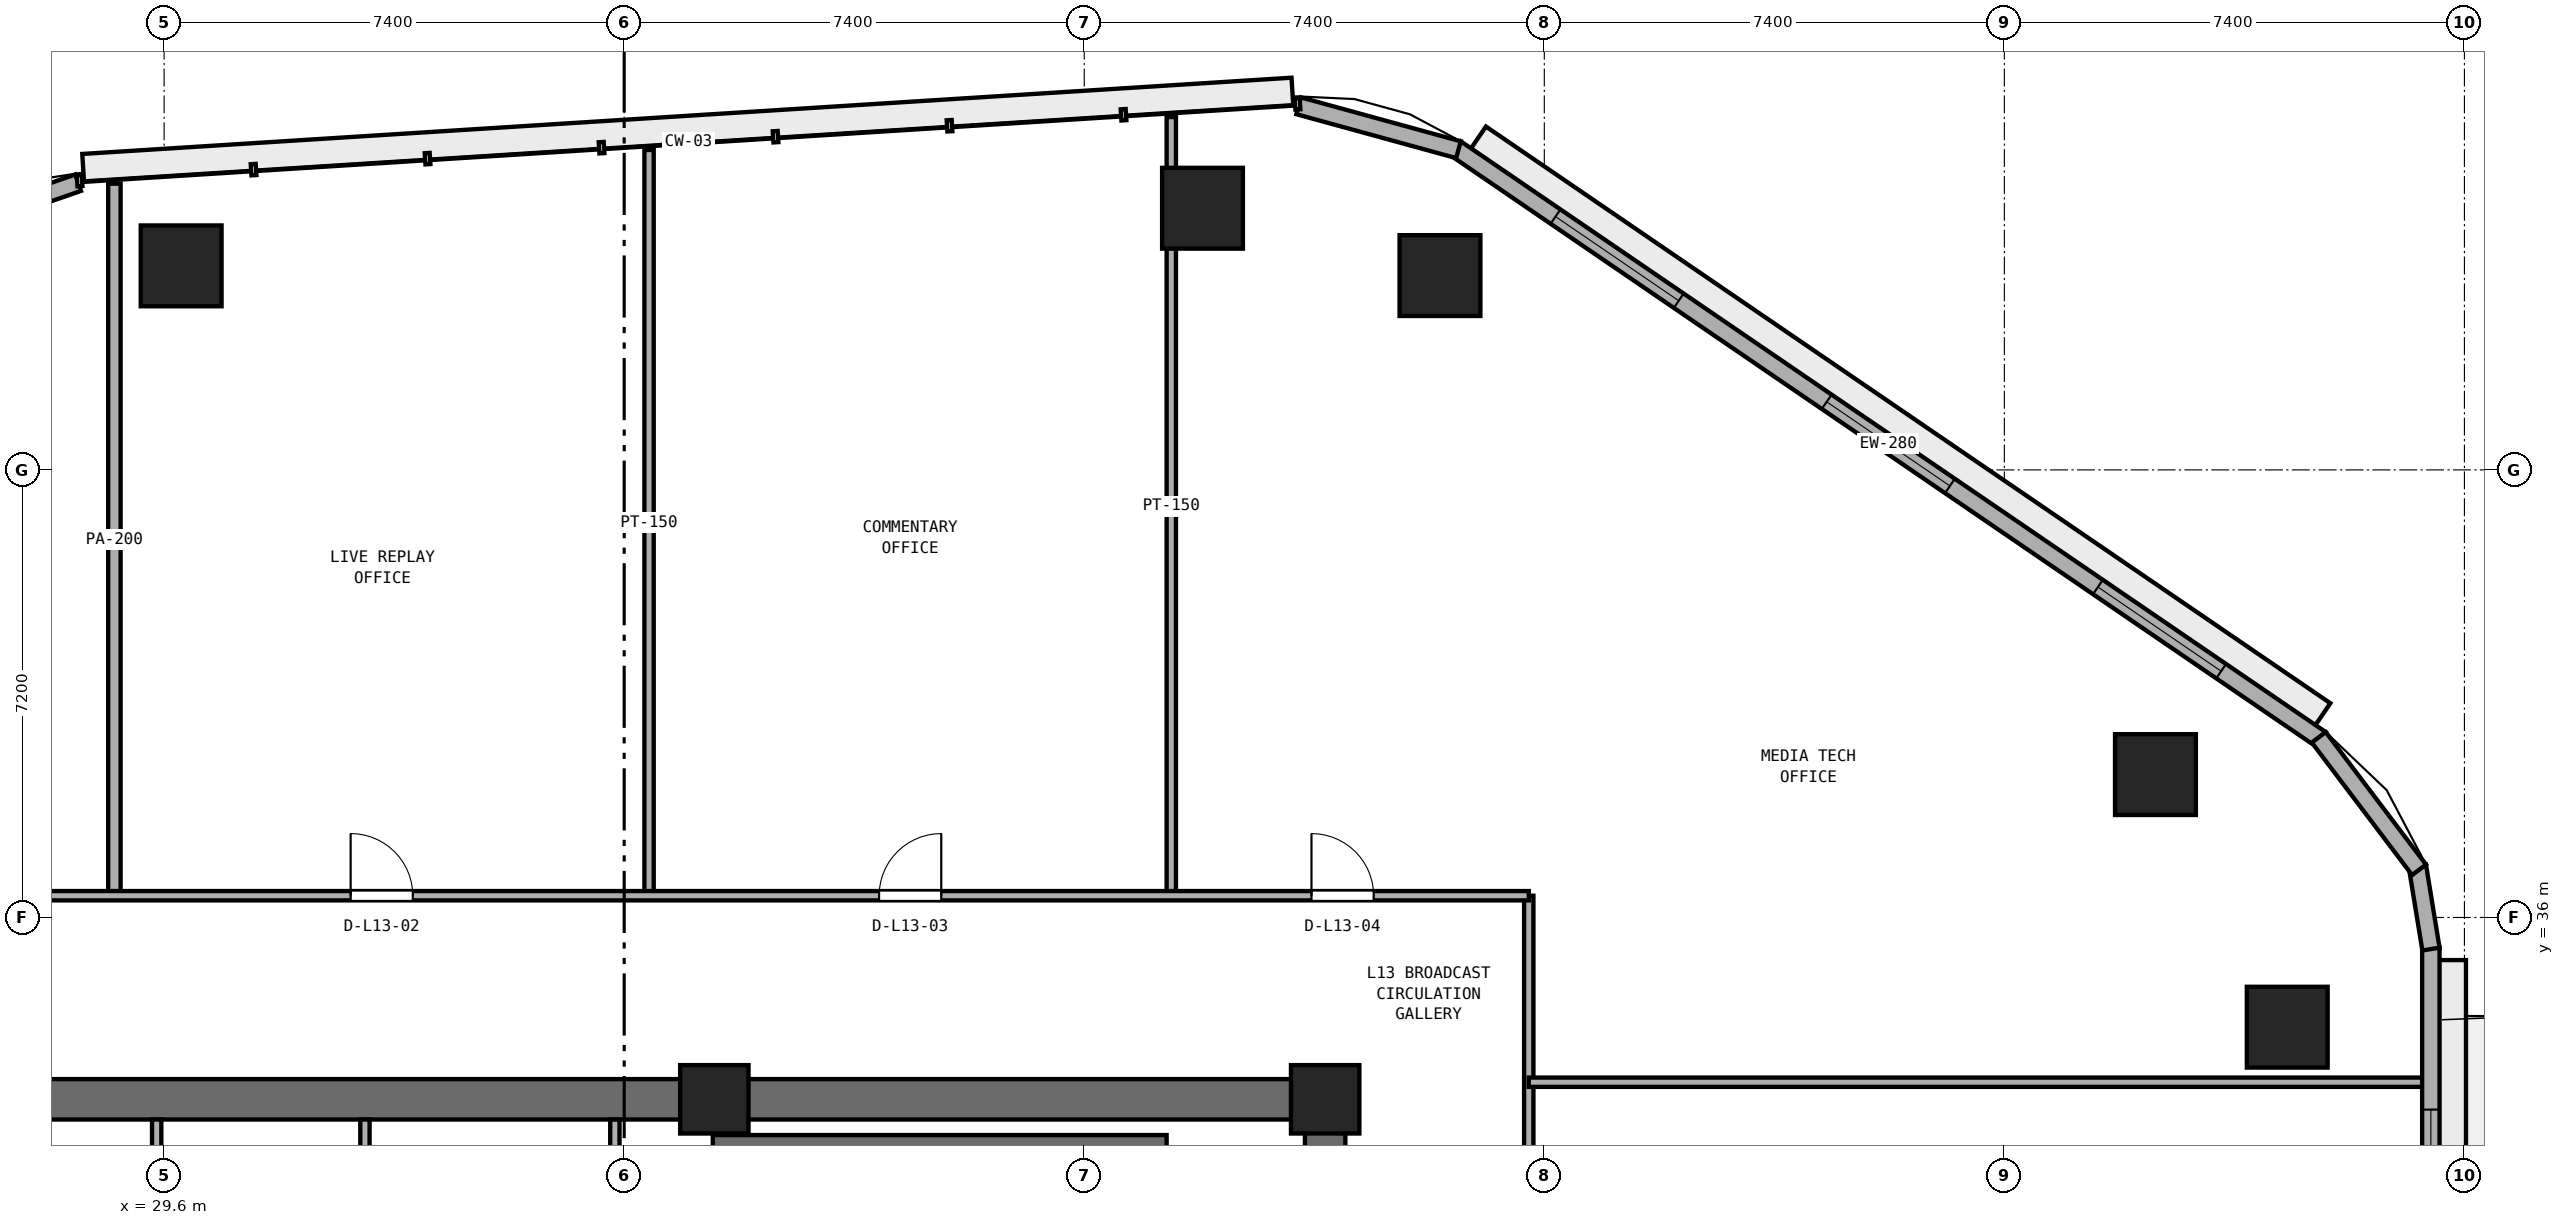
"""IFC4 building model, lengths in metres.
Left out: names, types, materials, properties, quantities, classifications, styles, units other than length and angle.
Written with IfcOpenShell. Run it as: python <this file> out.ifc"""

import sys

from ifc_helpers import new_model, si_unit, direction, frame, frame_2d, origin, origin_2d, place, context, subcontext, project, spatial, rectangle, extrude, element, fill, save


model = new_model("IFC4")
c1 = context("Model", 3, precision=1e-05, world=origin(), true_north=direction((0.0, 1.0)))
c2 = subcontext(c1, "Body", "Model", "MODEL_VIEW")
j1 = project(units=[si_unit("LENGTHUNIT", "METRE"), si_unit("PLANEANGLEUNIT", "RADIAN")], contexts=[c1])
p1 = place(None, origin())
s1 = spatial("IfcSite", under=j1, at=p1, CompositionType="ELEMENT")
p2 = place(p1, origin())
s2 = spatial("IfcBuilding", under=s1, at=p2, CompositionType="ELEMENT")
p3 = place(p2, frame((0.0, 0.0, 55.4)))
s3 = spatial("IfcBuildingStorey", under=s2, at=p3, CompositionType="ELEMENT", Elevation=55.4)
p4 = place(p3, frame((25.4, 33.075, 0.0), z_axis=(0.0, 0.0, 1.0), x_axis=(1.0, 0.0, 0.0)))
e1 = element("IfcWall", 1, at=p4, inside=s3, PredefinedType="SHEAR", context=c2, shape_type="SweptSolid", body=[
    extrude(rectangle(XDim=23.2, YDim=0.65, at=frame_2d((11.6, 0.0))), origin(), (0.0, 0.0, 1.0), 3.525),
])
p5 = place(p3, frame((48.275, 17.65, 0.0), z_axis=(0.0, 0.0, 1.0), x_axis=(0.0, 1.0, 0.0)))
e2 = element("IfcWall", 2, at=p5, inside=s3, PredefinedType="SHEAR", context=c2, shape_type="SweptSolid", body=[
    extrude(rectangle(XDim=15.1, YDim=0.65, at=frame_2d((7.55, 0.0))), origin(), (0.0, 0.0, 1.0), 3.525),
])
p6 = place(p5, frame((5.65, 0.0, 0.0)))
e3 = element("IfcOpeningElement", 3, at=p6, cuts=e2, PredefinedType="OPENING", context=c2, shape_type="SweptSolid", body=[
    extrude(rectangle(XDim=1.5, YDim=2.15, at=frame_2d((0.75, 1.075))), frame((0.0, 0.335, 0.0), z_axis=(0.0, -1.0, 0.0), x_axis=(1.0, 0.0, 0.0)), (0.0, 0.0, 1.0), 0.67),
])
for number, where, z_axis, x_axis in (
    (4, (48.275, 33.075, 0.0), (0.0, 0.0, 1.0), (1.0, 0.0, 0.0)),
    (5, (38.45, 33.075, 0.0), (0.0, 0.0, 1.0), (1.0, 0.0, 0.0)),
):
    element("IfcColumn", number, at=place(p3, frame(where, z_axis=z_axis, x_axis=x_axis)), inside=s3, PredefinedType="PILASTER", context=c2, shape_type="SweptSolid", body=[
        extrude(rectangle(XDim=1.1, YDim=1.1, at=origin_2d()), origin(), (0.0, 0.0, 1.0), 3.8),
    ])
for number, where, z_axis, x_axis in (
    (6, (63.75, 34.235, 0.0), (0.0, 0.0, 1.0), (1.0, 0.0, 0.0)),
    (7, (61.63, 38.299, 0.0), (0.0, 0.0, 1.0), (1.0, 0.0, 0.0)),
    (8, (50.122, 46.326, 0.0), (0.0, 0.0, 1.0), (1.0, 0.0, 0.0)),
    (9, (46.302, 47.409, 0.0), (0.0, 0.0, 1.0), (1.0, 0.0, 0.0)),
    (10, (29.874, 46.482, 0.0), (0.0, 0.0, 1.0), (1.0, 0.0, 0.0)),
):
    element("IfcColumn", number, at=place(p3, frame(where, z_axis=z_axis, x_axis=x_axis)), inside=s3, PredefinedType="COLUMN", context=c2, shape_type="SweptSolid", body=[
        extrude(rectangle(XDim=1.3, YDim=1.3, at=origin_2d()), origin(), (0.0, 0.0, 1.0), 3.8),
    ])
p7 = place(p3, frame((38.425, 32.375, 0.0), z_axis=(0.0, 0.0, 1.0), x_axis=(1.0, 0.0, 0.0)))
e11 = element("IfcWall", 11, at=p7, inside=s3, PredefinedType="SHEAR", context=c2, shape_type="SweptSolid", body=[
    extrude(rectangle(XDim=7.3, YDim=0.25, at=frame_2d((3.65, 0.0))), origin(), (0.0, 0.0, 1.0), 3.525),
])
for number, where, z_axis, x_axis in (
    (12, (29.48, 30.65, 0.0), (0.0, 0.0, 1.0), (0.0, 1.0, 0.0)),
    (13, (32.83, 30.65, 0.0), (0.0, 0.0, 1.0), (0.0, 1.0, 0.0)),
    (14, (36.85, 30.65, 0.0), (0.0, 0.0, 1.0), (0.0, 1.0, 0.0)),
):
    element("IfcWall", number, at=place(p3, frame(where, z_axis=z_axis, x_axis=x_axis)), inside=s3, PredefinedType="PARTITIONING", context=c2, shape_type="SweptSolid", body=[
        extrude(rectangle(XDim=2.1, YDim=0.15, at=frame_2d((1.05, 0.0))), origin(), (0.0, 0.0, 1.0), 3.525),
    ])
p8 = place(p3, frame((51.55, 14.05, 0.0), z_axis=(0.0, 0.0, 1.0), x_axis=(0.0, 1.0, 0.0)))
e15 = element("IfcWall", 15, at=p8, inside=s3, PredefinedType="PARTITIONING", context=c2, shape_type="SweptSolid", body=[
    extrude(rectangle(XDim=22.3, YDim=0.15, at=frame_2d((11.15, 0.0))), origin(), (0.0, 0.0, 1.0), 3.525),
])
p9 = place(p8, frame((4.325, 0.0, 0.0)))
e16 = element("IfcOpeningElement", 16, at=p9, cuts=e15, PredefinedType="OPENING", context=c2, shape_type="SweptSolid", body=[
    extrude(rectangle(XDim=0.9, YDim=2.1, at=frame_2d((0.45, 1.05))), frame((0.0, 0.085, 0.0), z_axis=(0.0, -1.0, 0.0), x_axis=(1.0, 0.0, 0.0)), (0.0, 0.0, 1.0), 0.17),
])
p10 = place(p8, frame((10.05, 0.0, 0.0)))
e17 = element("IfcOpeningElement", 17, at=p10, cuts=e15, PredefinedType="OPENING", context=c2, shape_type="SweptSolid", body=[
    extrude(rectangle(XDim=1.0, YDim=2.12, at=frame_2d((0.5, 1.06))), frame((0.0, 0.085, 0.0), z_axis=(0.0, -1.0, 0.0), x_axis=(1.0, 0.0, 0.0)), (0.0, 0.0, 1.0), 0.17),
])
p11 = place(p8, frame((16.425, 0.0, 0.0)))
e18 = element("IfcOpeningElement", 18, at=p11, cuts=e15, PredefinedType="OPENING", context=c2, shape_type="SweptSolid", body=[
    extrude(rectangle(XDim=1.0, YDim=2.12, at=frame_2d((0.5, 1.06))), frame((0.0, 0.085, 0.0), z_axis=(0.0, -1.0, 0.0), x_axis=(1.0, 0.0, 0.0)), (0.0, 0.0, 1.0), 0.17),
])
p12 = place(p3, frame((45.8, 36.35, 0.0), z_axis=(0.0, 0.0, 1.0), x_axis=(0.0, 1.0, 0.0)))
e19 = element("IfcWall", 19, at=p12, inside=s3, PredefinedType="PARTITIONING", context=c2, shape_type="SweptSolid", body=[
    extrude(rectangle(XDim=12.526, YDim=0.15, at=frame_2d((6.263, 0.0))), origin(), (0.0, 0.0, 1.0), 3.525),
])
p13 = place(p3, frame((37.4, 36.35, 0.0), z_axis=(0.0, 0.0, 1.0), x_axis=(0.0, 1.0, 0.0)))
e20 = element("IfcWall", 20, at=p13, inside=s3, PredefinedType="PARTITIONING", context=c2, shape_type="SweptSolid", body=[
    extrude(rectangle(XDim=11.997, YDim=0.15, at=frame_2d((5.998, 0.0))), origin(), (0.0, 0.0, 1.0), 3.525),
])
p14 = place(p3, frame((28.8, 36.35, 0.0), z_axis=(0.0, 0.0, 1.0), x_axis=(0.0, 1.0, 0.0)))
e21 = element("IfcWall", 21, at=p14, inside=s3, PredefinedType="PARTITIONING", context=c2, shape_type="SweptSolid", body=[
    extrude(rectangle(XDim=11.454, YDim=0.2, at=frame_2d((5.727, 0.0))), origin(), (0.0, 0.0, 1.0), 3.525),
])
p15 = place(p3, frame((51.55, 33.35, 0.0), z_axis=(0.0, 0.0, 1.0), x_axis=(1.0, 0.0, 0.0)))
e22 = element("IfcWall", 22, at=p15, inside=s3, PredefinedType="PARTITIONING", context=c2, shape_type="SweptSolid", body=[
    extrude(rectangle(XDim=14.445, YDim=0.15, at=frame_2d((7.223, 0.0))), origin(), (0.0, 0.0, 1.0), 2.908),
])
p16 = place(p3, frame((22.45, 36.35, 0.0), z_axis=(0.0, 0.0, 1.0), x_axis=(1.0, 0.0, 0.0)))
e23 = element("IfcWall", 23, at=p16, inside=s3, PredefinedType="PARTITIONING", context=c2, shape_type="SweptSolid", body=[
    extrude(rectangle(XDim=29.1, YDim=0.15, at=frame_2d((14.55, 0.0))), origin(), (0.0, 0.0, 1.0), 3.525),
])
p17 = place(p16, frame((2.795, 0.0, 0.0)))
e24 = element("IfcOpeningElement", 24, at=p17, cuts=e23, PredefinedType="OPENING", context=c2, shape_type="SweptSolid", body=[
    extrude(rectangle(XDim=1.0, YDim=2.12, at=frame_2d((0.5, 1.06))), frame((0.0, 0.085, 0.0), z_axis=(0.0, -1.0, 0.0), x_axis=(1.0, 0.0, 0.0)), (0.0, 0.0, 1.0), 0.17),
])
p18 = place(p16, frame((10.15, 0.0, 0.0)))
e25 = element("IfcOpeningElement", 25, at=p18, cuts=e23, PredefinedType="OPENING", context=c2, shape_type="SweptSolid", body=[
    extrude(rectangle(XDim=1.0, YDim=2.12, at=frame_2d((0.5, 1.06))), frame((0.0, 0.085, 0.0), z_axis=(0.0, -1.0, 0.0), x_axis=(1.0, 0.0, 0.0)), (0.0, 0.0, 1.0), 0.17),
])
p19 = place(p16, frame((18.65, 0.0, 0.0)))
e26 = element("IfcOpeningElement", 26, at=p19, cuts=e23, PredefinedType="OPENING", context=c2, shape_type="SweptSolid", body=[
    extrude(rectangle(XDim=1.0, YDim=2.12, at=frame_2d((0.5, 1.06))), frame((0.0, 0.085, 0.0), z_axis=(0.0, -1.0, 0.0), x_axis=(1.0, 0.0, 0.0)), (0.0, 0.0, 1.0), 0.17),
])
p20 = place(p16, frame((25.605, 0.0, 0.0)))
e27 = element("IfcOpeningElement", 27, at=p20, cuts=e23, PredefinedType="OPENING", context=c2, shape_type="SweptSolid", body=[
    extrude(rectangle(XDim=1.0, YDim=2.12, at=frame_2d((0.5, 1.06))), frame((0.0, 0.085, 0.0), z_axis=(0.0, -1.0, 0.0), x_axis=(1.0, 0.0, 0.0)), (0.0, 0.0, 1.0), 0.17),
])
p21 = place(p3, frame((66.06, 16.183, 0.0), z_axis=(0.0, 0.0, 1.0), x_axis=(0.0, 1.0, 0.0)))
e28 = element("IfcWall", 28, at=p21, inside=s3, PredefinedType="STANDARD", context=c2, shape_type="SweptSolid", body=[
    extrude(rectangle(XDim=19.331, YDim=0.28, at=frame_2d((9.666, 0.0))), origin(), (0.0, 0.0, 1.0), 3.525),
])
p22 = place(p21, frame((9.115, 0.0, 0.0)))
e29 = element("IfcOpeningElement", 29, at=p22, cuts=e28, PredefinedType="OPENING", context=c2, shape_type="SweptSolid", body=[
    extrude(rectangle(XDim=1.1, YDim=2.2, at=frame_2d((0.55, 1.1))), frame((0.0, 0.15, 0.0), z_axis=(0.0, -1.0, 0.0), x_axis=(1.0, 0.0, 0.0)), (0.0, 0.0, 1.0), 0.3),
])
p23 = place(p21, frame((1.575, 0.0, 0.9)))
e30 = element("IfcOpeningElement", 30, at=p23, cuts=e28, PredefinedType="OPENING", context=c2, shape_type="SweptSolid", body=[
    extrude(rectangle(XDim=2.4, YDim=1.75, at=frame_2d((1.2, 0.875))), frame((0.0, 0.15, 0.0), z_axis=(0.0, -1.0, 0.0), x_axis=(1.0, 0.0, 0.0)), (0.0, 0.0, 1.0), 0.3),
])
p24 = place(p21, frame((14.326, 0.0, 0.9)))
e31 = element("IfcOpeningElement", 31, at=p24, cuts=e28, PredefinedType="OPENING", context=c2, shape_type="SweptSolid", body=[
    extrude(rectangle(XDim=2.4, YDim=1.75, at=frame_2d((1.2, 0.875))), frame((0.0, 0.15, 0.0), z_axis=(0.0, -1.0, 0.0), x_axis=(1.0, 0.0, 0.0)), (0.0, 0.0, 1.0), 0.3),
])
p25 = place(p3, frame((64.29, 38.867, 0.0), z_axis=(0.0, 0.0, 1.0), x_axis=(-0.825755550159, 0.564028165416, 0.0)))
e32 = element("IfcWall", 32, at=p25, inside=s3, PredefinedType="STANDARD", context=c2, shape_type="SweptSolid", body=[
    extrude(rectangle(XDim=16.848, YDim=0.28, at=frame_2d((8.424, 0.0))), origin(), (0.0, 0.0, 1.0), 3.525),
])
p26 = place(p25, frame((1.941, 0.0, 0.9)))
e33 = element("IfcOpeningElement", 33, at=p26, cuts=e32, PredefinedType="OPENING", context=c2, shape_type="SweptSolid", body=[
    extrude(rectangle(XDim=2.4, YDim=1.75, at=frame_2d((1.2, 0.875))), frame((0.0, 0.15, 0.0), z_axis=(0.0, -1.0, 0.0), x_axis=(1.0, 0.0, 0.0)), (0.0, 0.0, 1.0), 0.3),
])
p27 = place(p25, frame((7.224, 0.0, 0.9)))
e34 = element("IfcOpeningElement", 34, at=p27, cuts=e32, PredefinedType="OPENING", context=c2, shape_type="SweptSolid", body=[
    extrude(rectangle(XDim=2.4, YDim=1.75, at=frame_2d((1.2, 0.875))), frame((0.0, 0.15, 0.0), z_axis=(0.0, -1.0, 0.0), x_axis=(1.0, 0.0, 0.0)), (0.0, 0.0, 1.0), 0.3),
])
p28 = place(p25, frame((12.507, 0.0, 0.9)))
e35 = element("IfcOpeningElement", 35, at=p28, cuts=e32, PredefinedType="OPENING", context=c2, shape_type="SweptSolid", body=[
    extrude(rectangle(XDim=2.4, YDim=1.75, at=frame_2d((1.2, 0.875))), frame((0.0, 0.15, 0.0), z_axis=(0.0, -1.0, 0.0), x_axis=(1.0, 0.0, 0.0)), (0.0, 0.0, 1.0), 0.3),
])
p29 = place(p3, frame((66.062, 35.492, 0.0), z_axis=(0.0, 0.0, 1.0), x_axis=(-0.161182073582, 0.986924687682, 0.0)))
e36 = element("IfcWall", 36, at=p29, inside=s3, PredefinedType="STANDARD", context=c2, shape_type="SweptSolid", body=[
    extrude(rectangle(XDim=1.354, YDim=0.28, at=frame_2d((0.677, 0.0))), origin(), (0.0, 0.0, 1.0), 3.525),
])
p30 = place(p3, frame((65.87, 36.767, 0.0), z_axis=(0.0, 0.0, 1.0), x_axis=(-0.603370463754, 0.797461023166, 0.0)))
e37 = element("IfcWall", 37, at=p30, inside=s3, PredefinedType="STANDARD", context=c2, shape_type="SweptSolid", body=[
    extrude(rectangle(XDim=2.673, YDim=0.28, at=frame_2d((1.336, 0.0))), origin(), (0.0, 0.0, 1.0), 3.525),
])
p31 = place(p3, frame((50.419, 48.351, 0.0), z_axis=(0.0, 0.0, 1.0), x_axis=(-0.964263320055, 0.264945748402, 0.0)))
e38 = element("IfcWall", 38, at=p31, inside=s3, PredefinedType="STANDARD", context=c2, shape_type="SweptSolid", body=[
    extrude(rectangle(XDim=2.666, YDim=0.28, at=frame_2d((1.333, 0.0))), origin(), (0.0, 0.0, 1.0), 3.525),
])
p32 = place(p3, frame((28.217, 47.82, 0.0), z_axis=(0.0, 0.0, 1.0), x_axis=(-0.944478751803, -0.328572499447, 0.0)))
e39 = element("IfcWall", 39, at=p32, inside=s3, PredefinedType="STANDARD", context=c2, shape_type="SweptSolid", body=[
    extrude(rectangle(XDim=2.19, YDim=0.28, at=frame_2d((1.095, 0.0))), origin(), (0.0, 0.0, 1.0), 3.525),
])
p33 = place(p18, origin())
e40 = element("IfcDoor", 40, at=p33, inside=s3, OperationType="SINGLE_SWING_LEFT", PredefinedType="DOOR", context=c2, shape_type="SweptSolid", body=[
    extrude(rectangle(XDim=1.0, YDim=2.12, at=frame_2d((0.5, 1.06))), frame((0.0, 0.025, 0.0), z_axis=(0.0, -1.0, 0.0), x_axis=(1.0, 0.0, 0.0)), (0.0, 0.0, 1.0), 0.05),
])
fill(e25, e40)
p34 = place(p19, origin())
e41 = element("IfcDoor", 41, at=p34, inside=s3, OperationType="SINGLE_SWING_RIGHT", PredefinedType="DOOR", context=c2, shape_type="SweptSolid", body=[
    extrude(rectangle(XDim=1.0, YDim=2.12, at=frame_2d((0.5, 1.06))), frame((0.0, 0.025, 0.0), z_axis=(0.0, -1.0, 0.0), x_axis=(1.0, 0.0, 0.0)), (0.0, 0.0, 1.0), 0.05),
])
fill(e26, e41)
p35 = place(p20, origin())
e42 = element("IfcDoor", 42, at=p35, inside=s3, OperationType="SINGLE_SWING_LEFT", PredefinedType="DOOR", context=c2, shape_type="SweptSolid", body=[
    extrude(rectangle(XDim=1.0, YDim=2.12, at=frame_2d((0.5, 1.06))), frame((0.0, 0.025, 0.0), z_axis=(0.0, -1.0, 0.0), x_axis=(1.0, 0.0, 0.0)), (0.0, 0.0, 1.0), 0.05),
])
fill(e27, e42)
p36 = place(p24, origin())
e43 = element("IfcWindow", 43, at=p36, inside=s3, PartitioningType="SINGLE_PANEL", PredefinedType="WINDOW", context=c2, shape_type="SweptSolid", body=[
    extrude(rectangle(XDim=2.4, YDim=1.75, at=frame_2d((1.2, 0.875))), frame((0.0, 0.03, 0.0), z_axis=(0.0, -1.0, 0.0), x_axis=(1.0, 0.0, 0.0)), (0.0, 0.0, 1.0), 0.06),
])
fill(e31, e43)
p37 = place(p26, origin())
e44 = element("IfcWindow", 44, at=p37, inside=s3, PartitioningType="SINGLE_PANEL", PredefinedType="WINDOW", context=c2, shape_type="SweptSolid", body=[
    extrude(rectangle(XDim=2.4, YDim=1.75, at=frame_2d((1.2, 0.875))), frame((0.0, 0.03, 0.0), z_axis=(0.0, -1.0, 0.0), x_axis=(1.0, 0.0, 0.0)), (0.0, 0.0, 1.0), 0.06),
])
fill(e33, e44)
p38 = place(p27, origin())
e45 = element("IfcWindow", 45, at=p38, inside=s3, PartitioningType="SINGLE_PANEL", PredefinedType="WINDOW", context=c2, shape_type="SweptSolid", body=[
    extrude(rectangle(XDim=2.4, YDim=1.75, at=frame_2d((1.2, 0.875))), frame((0.0, 0.03, 0.0), z_axis=(0.0, -1.0, 0.0), x_axis=(1.0, 0.0, 0.0)), (0.0, 0.0, 1.0), 0.06),
])
fill(e34, e45)
p39 = place(p28, origin())
e46 = element("IfcWindow", 46, at=p39, inside=s3, PartitioningType="SINGLE_PANEL", PredefinedType="WINDOW", context=c2, shape_type="SweptSolid", body=[
    extrude(rectangle(XDim=2.4, YDim=1.75, at=frame_2d((1.2, 0.875))), frame((0.0, 0.03, 0.0), z_axis=(0.0, -1.0, 0.0), x_axis=(1.0, 0.0, 0.0)), (0.0, 0.0, 1.0), 0.06),
])
fill(e35, e46)
save(model, sys.argv[1])
